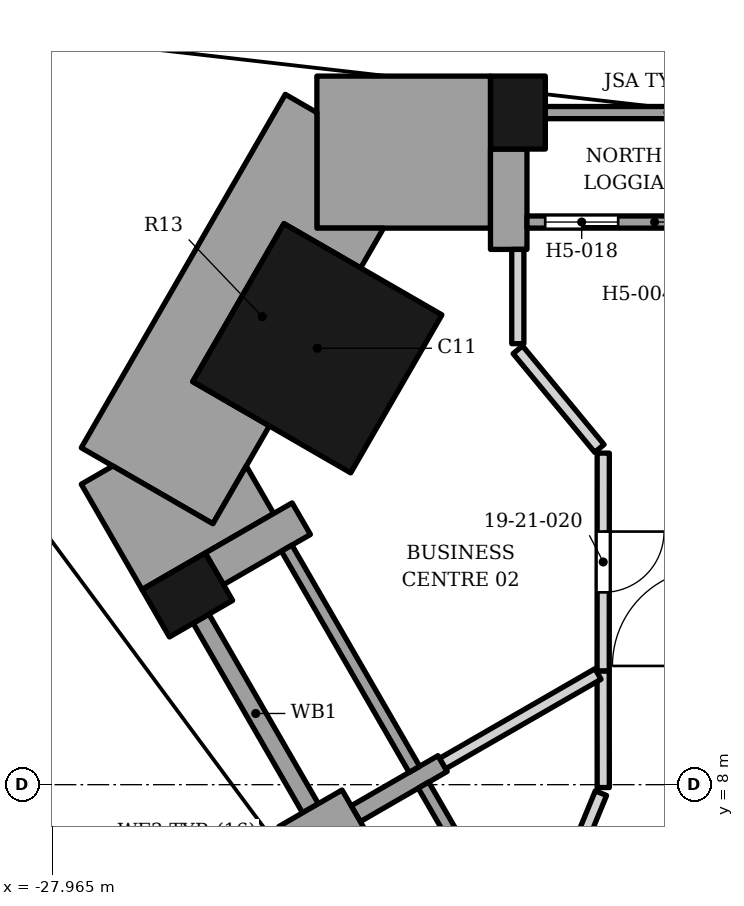
"""IFC4 building model, lengths in metres.
Left out: names, types, materials, properties, quantities, classifications, styles, units other than length and angle.
Written with IfcOpenShell. Run it as: python <this file> out.ifc"""

import sys

from ifc_helpers import new_model, si_unit, direction, frame, frame_2d, origin, origin_2d, place, context, subcontext, project, spatial, polyline, rectangle, outline, extrude, element, fill, save


model = new_model("IFC4")
c1 = context("Model", 3, precision=1e-05, world=origin(), true_north=direction((0.0, 1.0)))
c2 = subcontext(c1, "Body", "Model", "MODEL_VIEW")
j1 = project(units=[si_unit("LENGTHUNIT", "METRE"), si_unit("PLANEANGLEUNIT", "RADIAN")], contexts=[c1])
p1 = place(None, origin())
s1 = spatial("IfcSite", under=j1, at=p1, CompositionType="ELEMENT")
p2 = place(p1, origin())
s2 = spatial("IfcBuilding", under=s1, at=p2, CompositionType="ELEMENT")
p3 = place(p2, frame((0.0, 0.0, 91.8)))
s3 = spatial("IfcBuildingStorey", under=s2, at=p3, CompositionType="ELEMENT", Elevation=91.8)
p4 = place(p3, frame((-23.603, 15.177, 0.0), z_axis=(0.0, 0.0, 1.0), x_axis=(0.866025438691, -0.49999993954, 0.0)))
e1 = element("IfcColumn", 1, at=p4, inside=s3, PredefinedType="COLUMN", context=c2, shape_type="SweptSolid", body=[
    extrude(rectangle(XDim=3.0, YDim=3.0, at=origin_2d()), origin(), (0.0, 0.0, 1.0), 3.4),
])
for number, where, z_axis, x_axis in (
    (2, (-25.741, 11.119, 0.0), (0.0, 0.0, 1.0), (0.5, -0.866, 0.0)),
    (3, (-20.303, 19.053, 0.0), (0.0, 0.0, 1.0), (-1.0, 0.0, 0.0)),
):
    element("IfcColumn", number, at=place(p3, frame(where, z_axis=z_axis, x_axis=x_axis)), inside=s3, PredefinedType="COLUMN", context=c2, shape_type="SweptSolid", body=[
        extrude(rectangle(XDim=0.9, YDim=1.2, at=origin_2d()), origin(), (0.0, 0.0, 1.0), 3.4),
    ])
p5 = place(p3, frame((-25.296, 11.549, 0.0), z_axis=(0.0, 0.0, 1.0), x_axis=(0.866040211805, 0.499974350878, 0.0)))
e4 = element("IfcWall", 4, at=p5, inside=s3, PredefinedType="SOLIDWALL", context=c2, shape_type="SweptSolid", body=[
    extrude(rectangle(XDim=1.65, YDim=0.6, at=frame_2d((0.825, 0.0))), origin(), (0.0, 0.0, 1.0), 2.63),
])
p6 = place(p3, frame((-24.01, 6.922, 0.0), z_axis=(0.0, 0.0, 1.0), x_axis=(0.865955154139, 0.50012165622, 0.0)))
e5 = element("IfcWall", 5, at=p6, inside=s3, PredefinedType="SOLIDWALL", context=c2, shape_type="SweptSolid", body=[
    extrude(rectangle(XDim=1.2, YDim=0.9, at=frame_2d((0.6, 0.0))), origin(), (0.0, 0.0, 1.0), 2.63),
])
p7 = place(p3, frame((-22.971, 7.522, 0.0), z_axis=(0.0, 0.0, 1.0), x_axis=(0.866040211805, 0.499974350878, 0.0)))
e6 = element("IfcWall", 6, at=p7, inside=s3, PredefinedType="SOLIDWALL", context=c2, shape_type="SweptSolid", body=[
    extrude(rectangle(XDim=1.65, YDim=0.3, at=frame_2d((0.825, 0.0))), origin(), (0.0, 0.0, 1.0), 2.65),
])
p8 = place(p3, frame((-25.516, 10.73, 0.0), z_axis=(0.0, 0.0, 1.0), x_axis=(0.499961193289, -0.866047807691, 0.0)))
e7 = element("IfcWall", 7, at=p8, inside=s3, PredefinedType="SOLIDWALL", context=c2, shape_type="SweptSolid", body=[
    extrude(rectangle(XDim=3.6, YDim=0.3, at=frame_2d((1.8, 0.0))), origin(), (0.0, 0.0, 1.0), 2.63),
])
p9 = place(p3, frame((-24.107, 11.889, 0.0), z_axis=(0.0, 0.0, 1.0), x_axis=(0.500027713859, -0.866009402589, 0.0)))
e8 = element("IfcWall", 8, at=p9, inside=s3, PredefinedType="ELEMENTEDWALL", context=c2, shape_type="SweptSolid", body=[
    extrude(rectangle(XDim=4.2, YDim=0.2, at=frame_2d((2.1, 0.0))), origin(), (0.0, 0.0, 1.0), 2.65),
])
p10 = place(p3, frame((-21.857, 7.992, 0.0), z_axis=(0.0, 0.0, 1.0), x_axis=(0.500002543286, -0.866023935413, 0.0)))
e9 = element("IfcWall", 9, at=p10, inside=s3, PredefinedType="ELEMENTEDWALL", context=c2, shape_type="SweptSolid", body=[
    extrude(rectangle(XDim=4.2, YDim=0.2, at=frame_2d((2.1, 0.0))), origin(), (0.0, 0.0, 1.0), 2.65),
])
p11 = place(p3, origin())
e10 = element("IfcWall", 10, at=p11, inside=s3, PredefinedType="SOLIDWALL", context=c2, shape_type="SweptSolid", body=[
    extrude(outline(polyline([(-20.755, 18.453), (-20.755, 16.802), (-20.155, 16.802), (-20.155, 18.453), (-20.755, 18.453)])), origin(), (0.0, 0.0, 1.0), 2.63),
])
p12 = place(p3, origin())
e11 = element("IfcWall", 11, at=p12, inside=s3, PredefinedType="SOLIDWALL", context=c2, shape_type="SweptSolid", body=[
    extrude(outline(polyline([(-16.255, 19.052), (-16.255, 19.153), (-19.853, 19.153), (-19.853, 18.953), (-17.4, 18.953), (-17.4, 19.052), (-16.255, 19.052)])), origin(), (0.0, 0.0, 1.0), 2.65),
])
p13 = place(p3, frame((-15.955, 17.252, 0.0), z_axis=(0.0, 0.0, 1.0), x_axis=(-1.0, 0.0, 0.0)))
e12 = element("IfcWall", 12, at=p13, inside=s3, PredefinedType="ELEMENTEDWALL", context=c2, shape_type="SweptSolid", body=[
    extrude(rectangle(XDim=4.2, YDim=0.2, at=frame_2d((2.1, 0.0))), origin(), (0.0, 0.0, 1.0), 2.65),
])
p14 = place(p13, frame((2.7, 0.0, 0.0)))
e13 = element("IfcOpeningElement", 13, at=p14, cuts=e12, PredefinedType="OPENING", context=c2, shape_type="SweptSolid", body=[
    extrude(rectangle(XDim=1.2, YDim=2.4, at=frame_2d((0.6, 1.2))), frame((0.0, 0.11, 0.0), z_axis=(0.0, -1.0, 0.0), x_axis=(1.0, 0.0, 0.0)), (0.0, 0.0, 1.0), 0.22),
])
p15 = place(p3, origin())
e14 = element("IfcWall", 14, at=p15, inside=s3, PredefinedType="SOLIDWALL", context=c2, shape_type="SweptSolid", body=[
    extrude(outline(polyline([(-23.61, 17.153), (-20.755, 17.153), (-20.755, 19.653), (-23.61, 19.653), (-23.61, 17.153)])), origin(), (0.0, 0.0, 1.0), 2.63),
])
p16 = place(p3, origin())
e15 = element("IfcWall", 15, at=p16, inside=s3, PredefinedType="SOLIDWALL", context=c2, shape_type="SweptSolid", body=[
    extrude(outline(polyline([(-22.891, 16.498), (-22.513, 17.153), (-23.61, 17.153), (-23.61, 19.052), (-24.13, 19.353), (-27.485, 13.541), (-25.32, 12.291), (-24.391, 13.9), (-25.652, 14.628), (-24.152, 17.226), (-22.891, 16.498)])), origin(), (0.0, 0.0, 1.0), 2.63),
])
p17 = place(p3, origin())
e16 = element("IfcWall", 16, at=p17, inside=s3, PredefinedType="SOLIDWALL", context=c2, shape_type="SweptSolid", body=[
    extrude(outline(polyline([(-24.772, 13.241), (-25.32, 12.291), (-26.966, 13.241), (-27.485, 12.941), (-26.485, 11.209), (-24.32, 12.459), (-24.772, 13.241)])), origin(), (0.0, 0.0, 1.0), 2.63),
])
p18 = place(p3, frame((-19.459, 6.597, 0.0), z_axis=(0.0, 0.0, 1.0), x_axis=(0.380767778943, 0.92467069734, 0.0)))
e17 = element("IfcWall", 17, at=p18, inside=s3, PredefinedType="PARTITIONING", context=c2, shape_type="SweptSolid", body=[
    extrude(rectangle(XDim=1.366, YDim=0.2, at=frame_2d((0.683, 0.0))), origin(), (0.0, 0.0, 1.0), 3.23),
])
p19 = place(p3, frame((-18.902, 9.871, 0.0), z_axis=(0.0, 0.0, 1.0), x_axis=(0.000890698209, -0.999999603328, 0.0)))
e18 = element("IfcWall", 18, at=p19, inside=s3, PredefinedType="PARTITIONING", context=c2, shape_type="SweptSolid", body=[
    extrude(rectangle(XDim=1.919, YDim=0.2, at=frame_2d((0.959, 0.0))), origin(), (0.0, 0.0, 1.0), 3.23),
])
p20 = place(p3, frame((-21.542, 8.347, 0.0), z_axis=(0.0, 0.0, 1.0), x_axis=(0.866346792864, 0.499442924161, 0.0)))
e19 = element("IfcWall", 19, at=p20, inside=s3, PredefinedType="PARTITIONING", context=c2, shape_type="SweptSolid", body=[
    extrude(rectangle(XDim=2.949, YDim=0.2, at=frame_2d((1.475, 0.0))), origin(), (0.0, 0.0, 1.0), 3.23),
])
p21 = place(p3, frame((-18.902, 9.872, 0.0), z_axis=(0.0, 0.0, 1.0), x_axis=(0.000477261826, 0.999999886111, 0.0)))
e20 = element("IfcWall", 20, at=p21, inside=s3, PredefinedType="PARTITIONING", context=c2, shape_type="SweptSolid", body=[
    extrude(rectangle(XDim=3.581, YDim=0.2, at=frame_2d((1.791, 0.0))), origin(), (0.0, 0.0, 1.0), 3.23),
])
p22 = place(p21, frame((1.291, 0.0, 0.0)))
e21 = element("IfcOpeningElement", 21, at=p22, cuts=e20, PredefinedType="OPENING", context=c2, shape_type="SweptSolid", body=[
    extrude(rectangle(XDim=1.0, YDim=2.1, at=frame_2d((0.5, 1.05))), frame((0.0, 0.11, 0.0), z_axis=(0.0, -1.0, 0.0), x_axis=(1.0, 0.0, 0.0)), (0.0, 0.0, 1.0), 0.22),
])
p23 = place(p3, frame((-20.306, 15.152, 0.0), z_axis=(0.0, 0.0, 1.0), x_axis=(0.637157085783, -0.770733967097, 0.0)))
e22 = element("IfcWall", 22, at=p23, inside=s3, PredefinedType="PARTITIONING", context=c2, shape_type="SweptSolid", body=[
    extrude(rectangle(XDim=2.105, YDim=0.2, at=frame_2d((1.053, 0.0))), origin(), (0.0, 0.0, 1.0), 3.23),
])
p24 = place(p3, frame((-20.306, 16.802, 0.0), z_axis=(0.0, 0.0, 1.0), x_axis=(0.0, -1.0, 0.0)))
e23 = element("IfcWall", 23, at=p24, inside=s3, PredefinedType="PARTITIONING", context=c2, shape_type="SweptSolid", body=[
    extrude(rectangle(XDim=1.55, YDim=0.2, at=frame_2d((0.775, 0.0))), origin(), (0.0, 0.0, 1.0), 3.23),
])
p25 = place(p14, origin())
e24 = element("IfcDoor", 24, at=p25, inside=s3, OperationType="SINGLE_SWING_LEFT", PredefinedType="DOOR", context=c2, shape_type="SweptSolid", body=[
    extrude(rectangle(XDim=1.2, YDim=2.4, at=frame_2d((0.6, 1.2))), frame((0.0, 0.025, 0.0), z_axis=(0.0, -1.0, 0.0), x_axis=(1.0, 0.0, 0.0)), (0.0, 0.0, 1.0), 0.05),
])
fill(e13, e24)
p26 = place(p22, origin())
e25 = element("IfcDoor", 25, at=p26, inside=s3, OperationType="SINGLE_SWING_RIGHT", PredefinedType="DOOR", context=c2, shape_type="SweptSolid", body=[
    extrude(rectangle(XDim=1.0, YDim=2.1, at=frame_2d((0.5, 1.05))), frame((0.0, 0.025, 0.0), z_axis=(0.0, -1.0, 0.0), x_axis=(1.0, 0.0, 0.0)), (0.0, 0.0, 1.0), 0.05),
])
fill(e21, e25)
save(model, sys.argv[1])
